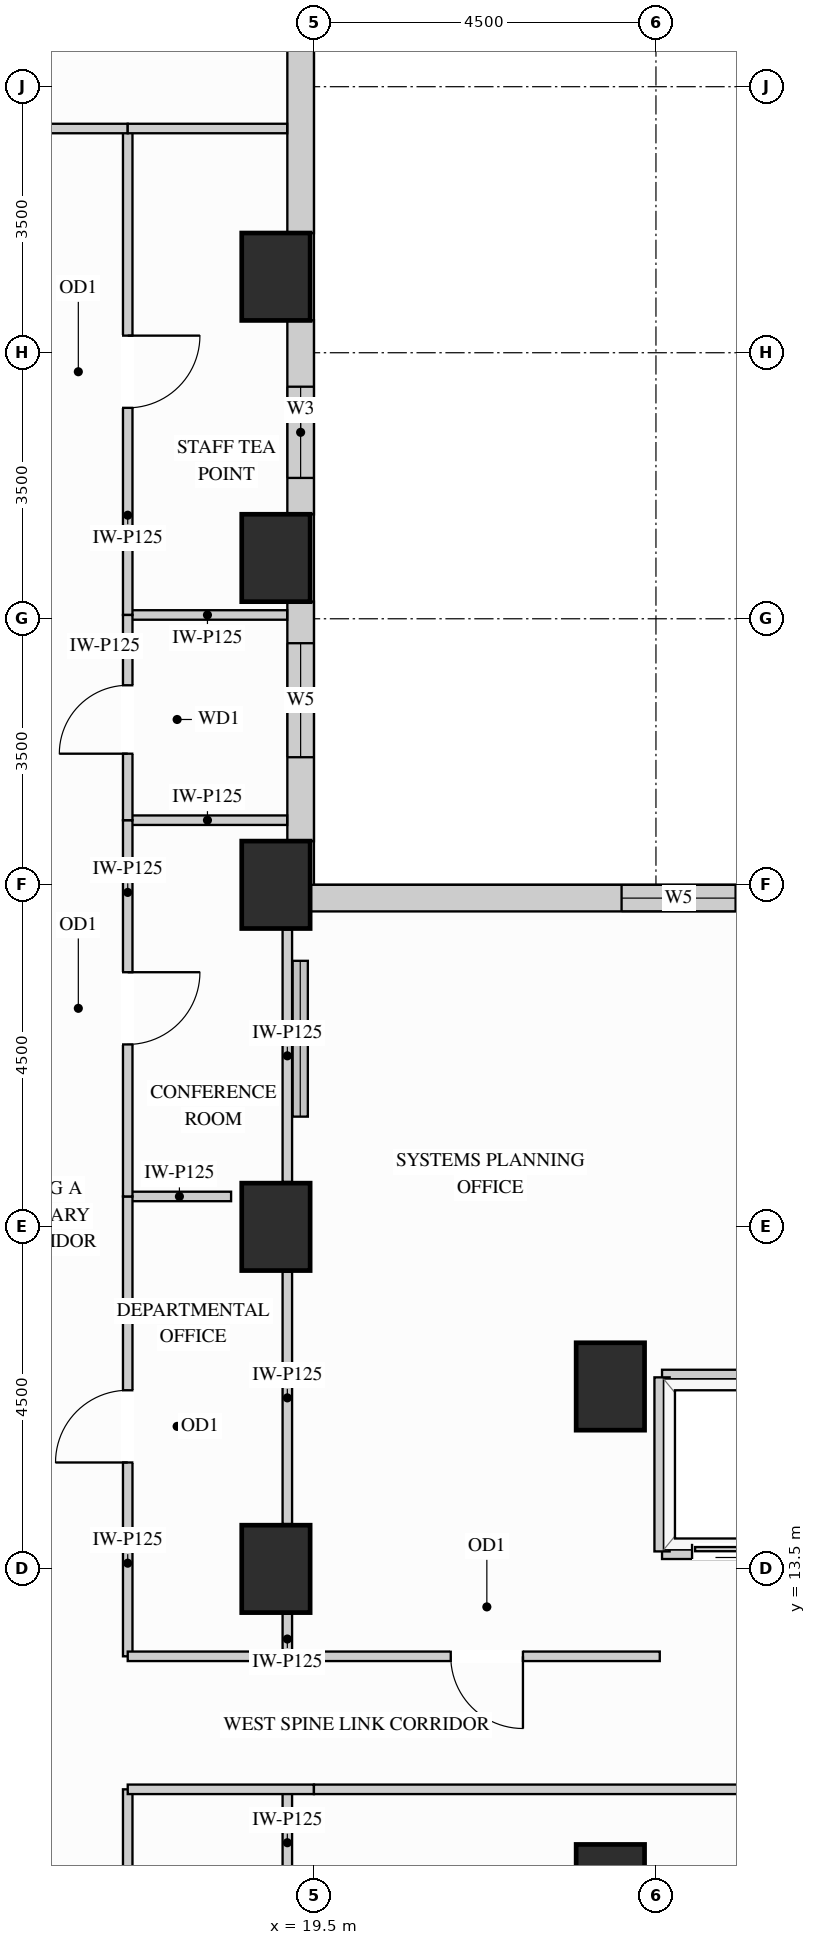
"""IFC4 building model, lengths in metres.
Left out: names, types, materials, properties, quantities, classifications, styles, units other than length and angle.
Written with IfcOpenShell. Run it as: python <this file> out.ifc"""

import sys

from ifc_helpers import new_model, si_unit, direction, frame, frame_2d, origin, origin_2d, place, context, subcontext, project, spatial, rectangle, extrude, source, transform, mapped, element, fill, save


model = new_model("IFC4")
c1 = context("Model", 3, precision=1e-05, world=origin(), true_north=direction((0.0, 1.0)))
c2 = subcontext(c1, "Body", "Model", "MODEL_VIEW")
j1 = project(units=[si_unit("LENGTHUNIT", "METRE"), si_unit("PLANEANGLEUNIT", "RADIAN")], contexts=[c1])
p1 = place(None, origin())
s1 = spatial("IfcSite", under=j1, at=p1, CompositionType="ELEMENT")
p2 = place(p1, origin())
s2 = spatial("IfcBuilding", under=s1, at=p2, CompositionType="ELEMENT")
p3 = place(p2, frame((0.0, 0.0, 81.0)))
s3 = spatial("IfcBuildingStorey", under=s2, at=p3, CompositionType="ELEMENT", Elevation=81.0)
m1 = source(origin(), c2, "Body", "SweptSolid", [
    extrude(rectangle(XDim=0.9, YDim=1.15, at=origin_2d()), origin(), (0.0, 0.0, 1.0), 3.38),
])
for number, where, z_axis, x_axis in (
    (1, (19.0, 13.5, 0.0), (0.0, 0.0, 1.0), (1.0, 0.0, 0.0)),
    (2, (19.0, 18.0, 0.0), (0.0, 0.0, 1.0), (1.0, 0.0, 0.0)),
    (3, (19.0, 22.5, 0.0), (0.0, 0.0, 1.0), (1.0, 0.0, 0.0)),
    (4, (19.0, 26.8, 0.0), (0.0, 0.0, 1.0), (1.0, 0.0, 0.0)),
    (5, (19.0, 30.5, 0.0), (0.0, 0.0, 1.0), (1.0, 0.0, 0.0)),
    (6, (23.4, 15.9, 0.0), (0.0, 0.0, 1.0), (1.0, 0.0, 0.0)),
    (7, (23.4, 9.3, 0.0), (0.0, 0.0, 1.0), (1.0, 0.0, 0.0)),
):
    element("IfcColumn", number, at=place(p3, frame(where, z_axis=z_axis, x_axis=x_axis)), inside=s3, PredefinedType="COLUMN", context=c2, shape_type="MappedRepresentation", body=[
        mapped(m1, transform((0.0, 0.0, 0.0), x_axis=(1.0, 0.0, 0.0), y_axis=(0.0, 1.0, 0.0), z_axis=(0.0, 0.0, 1.0))),
    ])
p4 = place(p3, frame((34.427, 22.325, 0.0), z_axis=(0.0, 0.0, 1.0), x_axis=(-1.0, 0.0, 0.0)))
e8 = element("IfcWall", 8, at=p4, inside=s3, PredefinedType="SOLIDWALL", context=c2, shape_type="SweptSolid", body=[
    extrude(rectangle(XDim=14.979, YDim=0.35, at=frame_2d((7.49, 0.0))), origin(), (0.0, 0.0, 1.0), 3.365),
])
p5 = place(p4, frame((4.1, 0.0, 0.78)))
e9 = element("IfcOpeningElement", 9, at=p5, cuts=e8, PredefinedType="OPENING", context=c2, shape_type="SweptSolid", body=[
    extrude(rectangle(XDim=1.5, YDim=2.0, at=frame_2d((0.75, 1.0))), frame((0.0, 0.185, 0.0), z_axis=(0.0, -1.0, 0.0), x_axis=(1.0, 0.0, 0.0)), (0.0, 0.0, 1.0), 0.37),
])
p6 = place(p4, frame((9.379, 0.0, 0.78)))
e10 = element("IfcOpeningElement", 10, at=p6, cuts=e8, PredefinedType="OPENING", context=c2, shape_type="SweptSolid", body=[
    extrude(rectangle(XDim=1.5, YDim=2.0, at=frame_2d((0.75, 1.0))), frame((0.0, 0.185, 0.0), z_axis=(0.0, -1.0, 0.0), x_axis=(1.0, 0.0, 0.0)), (0.0, 0.0, 1.0), 0.37),
])
p7 = place(p3, frame((19.325, 23.073, 0.0), z_axis=(0.0, 0.0, 1.0), x_axis=(0.0, 1.0, 0.0)))
e11 = element("IfcWall", 11, at=p7, inside=s3, PredefinedType="SOLIDWALL", context=c2, shape_type="SweptSolid", body=[
    extrude(rectangle(XDim=3.154, YDim=0.35, at=frame_2d((1.577, 0.0))), origin(), (0.0, 0.0, 1.0), 2.519),
])
p8 = place(p7, frame((1.105, 0.0, 0.78)))
e12 = element("IfcOpeningElement", 12, at=p8, cuts=e11, PredefinedType="OPENING", context=c2, shape_type="SweptSolid", body=[
    extrude(rectangle(XDim=1.5, YDim=1.559, at=frame_2d((0.75, 0.78))), frame((0.0, 0.185, 0.0), z_axis=(0.0, -1.0, 0.0), x_axis=(1.0, 0.0, 0.0)), (0.0, 0.0, 1.0), 0.37),
])
p9 = place(p3, frame((19.325, 27.373, 0.0), z_axis=(0.0, 0.0, 1.0), x_axis=(0.0, 1.0, 0.0)))
e13 = element("IfcWall", 13, at=p9, inside=s3, PredefinedType="SOLIDWALL", context=c2, shape_type="SweptSolid", body=[
    extrude(rectangle(XDim=2.554, YDim=0.35, at=frame_2d((1.277, 0.0))), origin(), (0.0, 0.0, 1.0), 2.519),
])
p10 = place(p9, frame((0.48, 0.0, 0.78)))
e14 = element("IfcOpeningElement", 14, at=p10, cuts=e13, PredefinedType="OPENING", context=c2, shape_type="SweptSolid", body=[
    extrude(rectangle(XDim=1.2, YDim=1.559, at=frame_2d((0.6, 0.78))), frame((0.0, 0.185, 0.0), z_axis=(0.0, -1.0, 0.0), x_axis=(1.0, 0.0, 0.0)), (0.0, 0.0, 1.0), 0.37),
])
m2 = source(origin(), c2, "Body", "SweptSolid", [
    extrude(rectangle(XDim=3.354, YDim=0.35, at=frame_2d((1.677, 0.0))), origin(), (0.0, 0.0, 1.0), 2.519),
])
p11 = place(p3, frame((19.325, 31.073, 0.0), z_axis=(0.0, 0.0, 1.0), x_axis=(0.0, 1.0, 0.0)))
e15 = element("IfcWall", 15, at=p11, inside=s3, PredefinedType="SOLIDWALL", context=c2, shape_type="MappedRepresentation", body=[
    mapped(m2, transform((0.0, 0.0, 0.0), x_axis=(1.0, 0.0, 0.0), y_axis=(0.0, 1.0, 0.0), z_axis=(0.0, 0.0, 1.0))),
])
m3 = source(origin(), c2, "Body", "SweptSolid", [
    extrude(rectangle(XDim=1.36, YDim=0.125, at=frame_2d((0.68, 0.0))), origin(), (0.0, 0.0, 1.0), 3.365),
])
p12 = place(p3, frame((17.05, 18.4, 0.0), z_axis=(0.0, 0.0, 1.0), x_axis=(1.0, 0.0, 0.0)))
e16 = element("IfcWall", 16, at=p12, inside=s3, PredefinedType="PARTITIONING", context=c2, shape_type="MappedRepresentation", body=[
    mapped(m3, transform((0.0, 0.0, 0.0), x_axis=(1.0, 0.0, 0.0), y_axis=(0.0, 1.0, 0.0), z_axis=(0.0, 0.0, 1.0))),
])
m4 = source(origin(), c2, "Body", "SweptSolid", [
    extrude(rectangle(XDim=2.098, YDim=0.125, at=frame_2d((1.049, 0.0))), origin(), (0.0, 0.0, 1.0), 3.365),
])
for number, where, z_axis, x_axis in (
    (17, (17.05, 23.35, 0.0), (0.0, 0.0, 1.0), (1.0, 0.0, 0.0)),
    (18, (17.05, 26.05, 0.0), (0.0, 0.0, 1.0), (1.0, 0.0, 0.0)),
):
    element("IfcWall", number, at=place(p3, frame(where, z_axis=z_axis, x_axis=x_axis)), inside=s3, PredefinedType="PARTITIONING", context=c2, shape_type="MappedRepresentation", body=[
        mapped(m4, transform((0.0, 0.0, 0.0), x_axis=(1.0, 0.0, 0.0), y_axis=(0.0, 1.0, 0.0), z_axis=(0.0, 0.0, 1.0))),
    ])
m5 = source(origin(), c2, "Body", "SweptSolid", [
    extrude(rectangle(XDim=0.56, YDim=0.125, at=frame_2d((0.28, 0.0))), origin(), (0.0, 0.0, 1.0), 2.677),
])
p13 = place(p3, frame((19.15, 12.35, 0.0), z_axis=(0.0, 0.0, 1.0), x_axis=(0.0, 1.0, 0.0)))
e19 = element("IfcWall", 19, at=p13, inside=s3, PredefinedType="PARTITIONING", context=c2, shape_type="MappedRepresentation", body=[
    mapped(m5, transform((0.0, 0.0, 0.0), x_axis=(1.0, 0.0, 0.0), y_axis=(0.0, 1.0, 0.0), z_axis=(0.0, 0.0, 1.0))),
])
m6 = source(origin(), c2, "Body", "SweptSolid", [
    extrude(rectangle(XDim=3.32, YDim=0.125, at=frame_2d((1.66, 0.0))), origin(), (0.0, 0.0, 1.0), 2.677),
])
for number, where, z_axis, x_axis in (
    (20, (19.15, 14.09, 0.0), (0.0, 0.0, 1.0), (0.0, 1.0, 0.0)),
    (21, (19.15, 18.59, 0.0), (0.0, 0.0, 1.0), (0.0, 1.0, 0.0)),
):
    element("IfcWall", number, at=place(p3, frame(where, z_axis=z_axis, x_axis=x_axis)), inside=s3, PredefinedType="PARTITIONING", context=c2, shape_type="MappedRepresentation", body=[
        mapped(m6, transform((0.0, 0.0, 0.0), x_axis=(1.0, 0.0, 0.0), y_axis=(0.0, 1.0, 0.0), z_axis=(0.0, 0.0, 1.0))),
    ])
m7 = source(origin(), c2, "Body", "SweptSolid", [
    extrude(rectangle(XDim=1.51, YDim=0.125, at=frame_2d((0.755, 0.0))), origin(), (0.0, 0.0, 1.0), 2.677),
])
p14 = place(p3, frame((19.15, 9.09, 0.0), z_axis=(0.0, 0.0, 1.0), x_axis=(0.0, 1.0, 0.0)))
e22 = element("IfcWall", 22, at=p14, inside=s3, PredefinedType="PARTITIONING", context=c2, shape_type="MappedRepresentation", body=[
    mapped(m7, transform((0.0, 0.0, 0.0), x_axis=(1.0, 0.0, 0.0), y_axis=(0.0, 1.0, 0.0), z_axis=(0.0, 0.0, 1.0))),
])
p15 = place(p3, frame((17.05, 12.35, 0.0), z_axis=(0.0, 0.0, 1.0), x_axis=(0.0, 1.0, 0.0)))
e23 = element("IfcWall", 23, at=p15, inside=s3, PredefinedType="PARTITIONING", context=c2, shape_type="SweptSolid", body=[
    extrude(rectangle(XDim=6.05, YDim=0.125, at=frame_2d((3.025, 0.0))), origin(), (0.0, 0.0, 1.0), 3.365),
])
p16 = place(p15, frame((2.55, 0.0, 0.0)))
e24 = element("IfcOpeningElement", 24, at=p16, cuts=e23, PredefinedType="OPENING", context=c2, shape_type="SweptSolid", body=[
    extrude(rectangle(XDim=0.95, YDim=2.15, at=frame_2d((0.475, 1.075))), frame((0.0, 0.073, 0.0), z_axis=(0.0, -1.0, 0.0), x_axis=(1.0, 0.0, 0.0)), (0.0, 0.0, 1.0), 0.145),
])
p17 = place(p3, frame((17.05, 18.4, 0.0), z_axis=(0.0, 0.0, 1.0), x_axis=(0.0, 1.0, 0.0)))
e25 = element("IfcWall", 25, at=p17, inside=s3, PredefinedType="PARTITIONING", context=c2, shape_type="SweptSolid", body=[
    extrude(rectangle(XDim=4.95, YDim=0.125, at=frame_2d((2.475, 0.0))), origin(), (0.0, 0.0, 1.0), 3.365),
])
p18 = place(p17, frame((2.0, 0.0, 0.0)))
e26 = element("IfcOpeningElement", 26, at=p18, cuts=e25, PredefinedType="OPENING", context=c2, shape_type="SweptSolid", body=[
    extrude(rectangle(XDim=0.95, YDim=2.15, at=frame_2d((0.475, 1.075))), frame((0.0, 0.073, 0.0), z_axis=(0.0, -1.0, 0.0), x_axis=(1.0, 0.0, 0.0)), (0.0, 0.0, 1.0), 0.145),
])
p19 = place(p3, frame((17.05, 26.05, 0.0), z_axis=(0.0, 0.0, 1.0), x_axis=(0.0, 1.0, 0.0)))
e27 = element("IfcWall", 27, at=p19, inside=s3, PredefinedType="PARTITIONING", context=c2, shape_type="SweptSolid", body=[
    extrude(rectangle(XDim=6.4, YDim=0.125, at=frame_2d((3.2, 0.0))), origin(), (0.0, 0.0, 1.0), 3.365),
])
p20 = place(p19, frame((2.725, 0.0, 0.0)))
e28 = element("IfcOpeningElement", 28, at=p20, cuts=e27, PredefinedType="OPENING", context=c2, shape_type="SweptSolid", body=[
    extrude(rectangle(XDim=0.95, YDim=2.15, at=frame_2d((0.475, 1.075))), frame((0.0, 0.073, 0.0), z_axis=(0.0, -1.0, 0.0), x_axis=(1.0, 0.0, 0.0)), (0.0, 0.0, 1.0), 0.145),
])
p21 = place(p3, frame((17.05, 5.5, 0.0), z_axis=(0.0, 0.0, 1.0), x_axis=(0.0, 1.0, 0.0)))
e29 = element("IfcWall", 29, at=p21, inside=s3, PredefinedType="PARTITIONING", context=c2, shape_type="SweptSolid", body=[
    extrude(rectangle(XDim=5.1, YDim=0.125, at=frame_2d((2.55, 0.0))), origin(), (0.0, 0.0, 1.0), 3.365),
])
p22 = place(p21, frame((2.075, 0.0, 0.0)))
e30 = element("IfcOpeningElement", 30, at=p22, cuts=e29, PredefinedType="OPENING", context=c2, shape_type="SweptSolid", body=[
    extrude(rectangle(XDim=0.95, YDim=2.15, at=frame_2d((0.475, 1.075))), frame((0.0, 0.073, 0.0), z_axis=(0.0, -1.0, 0.0), x_axis=(1.0, 0.0, 0.0)), (0.0, 0.0, 1.0), 0.145),
])
p23 = place(p3, frame((17.05, 23.35, 0.0), z_axis=(0.0, 0.0, 1.0), x_axis=(0.0, 1.0, 0.0)))
e31 = element("IfcWall", 31, at=p23, inside=s3, PredefinedType="PARTITIONING", context=c2, shape_type="SweptSolid", body=[
    extrude(rectangle(XDim=2.7, YDim=0.125, at=frame_2d((1.35, 0.0))), origin(), (0.0, 0.0, 1.0), 3.365),
])
p24 = place(p23, frame((0.875, 0.0, 0.0)))
e32 = element("IfcOpeningElement", 32, at=p24, cuts=e31, PredefinedType="OPENING", context=c2, shape_type="SweptSolid", body=[
    extrude(rectangle(XDim=0.9, YDim=2.15, at=frame_2d((0.45, 1.075))), frame((0.0, 0.073, 0.0), z_axis=(0.0, -1.0, 0.0), x_axis=(1.0, 0.0, 0.0)), (0.0, 0.0, 1.0), 0.145),
])
p25 = place(p3, frame((9.039, 32.45, 0.0), z_axis=(0.0, 0.0, 1.0), x_axis=(1.0, 0.0, 0.0)))
e33 = element("IfcWall", 33, at=p25, inside=s3, PredefinedType="PARTITIONING", context=c2, shape_type="SweptSolid", body=[
    extrude(rectangle(XDim=8.011, YDim=0.125, at=frame_2d((4.005, 0.0))), origin(), (0.0, 0.0, 1.0), 3.365),
])
p26 = place(p25, frame((3.531, 0.0, 0.0)))
e34 = element("IfcOpeningElement", 34, at=p26, cuts=e33, PredefinedType="OPENING", context=c2, shape_type="SweptSolid", body=[
    extrude(rectangle(XDim=0.95, YDim=2.15, at=frame_2d((0.475, 1.075))), frame((0.0, 0.073, 0.0), z_axis=(0.0, -1.0, 0.0), x_axis=(1.0, 0.0, 0.0)), (0.0, 0.0, 1.0), 0.145),
])
p27 = place(p3, frame((17.05, 32.45, 0.0), z_axis=(0.0, 0.0, 1.0), x_axis=(1.0, 0.0, 0.0)))
e35 = element("IfcWall", 35, at=p27, inside=s3, PredefinedType="PARTITIONING", context=c2, shape_type="MappedRepresentation", body=[
    mapped(m4, transform((0.0, 0.0, 0.0), x_axis=(1.0, 0.0, 0.0), y_axis=(0.0, 1.0, 0.0), z_axis=(0.0, 0.0, 1.0))),
])
m8 = source(origin(), c2, "Body", "SweptSolid", [
    extrude(rectangle(XDim=2.45, YDim=0.125, at=frame_2d((1.225, 0.0))), origin(), (0.0, 0.0, 1.0), 3.365),
])
p28 = place(p3, frame((17.05, 12.35, 0.0), z_axis=(0.0, 0.0, 1.0), x_axis=(1.0, 0.0, 0.0)))
e36 = element("IfcWall", 36, at=p28, inside=s3, PredefinedType="PARTITIONING", context=c2, shape_type="MappedRepresentation", body=[
    mapped(m8, transform((0.0, 0.0, 0.0), x_axis=(1.0, 0.0, 0.0), y_axis=(0.0, 1.0, 0.0), z_axis=(0.0, 0.0, 1.0))),
])
p29 = place(p3, frame((19.5, 12.35, 0.0), z_axis=(0.0, 0.0, 1.0), x_axis=(1.0, 0.0, 0.0)))
e37 = element("IfcWall", 37, at=p29, inside=s3, PredefinedType="PARTITIONING", context=c2, shape_type="SweptSolid", body=[
    extrude(rectangle(XDim=4.55, YDim=0.125, at=frame_2d((2.275, 0.0))), origin(), (0.0, 0.0, 1.0), 3.365),
])
p30 = place(p29, frame((1.8, 0.0, 0.0)))
e38 = element("IfcOpeningElement", 38, at=p30, cuts=e37, PredefinedType="OPENING", context=c2, shape_type="SweptSolid", body=[
    extrude(rectangle(XDim=0.95, YDim=2.15, at=frame_2d((0.475, 1.075))), frame((0.0, 0.073, 0.0), z_axis=(0.0, -1.0, 0.0), x_axis=(1.0, 0.0, 0.0)), (0.0, 0.0, 1.0), 0.145),
])
p31 = place(p3, frame((17.05, 10.6, 0.0), z_axis=(0.0, 0.0, 1.0), x_axis=(1.0, 0.0, 0.0)))
e39 = element("IfcWall", 39, at=p31, inside=s3, PredefinedType="PARTITIONING", context=c2, shape_type="MappedRepresentation", body=[
    mapped(m8, transform((0.0, 0.0, 0.0), x_axis=(1.0, 0.0, 0.0), y_axis=(0.0, 1.0, 0.0), z_axis=(0.0, 0.0, 1.0))),
])
p32 = place(p3, frame((19.5, 10.6, 0.0), z_axis=(0.0, 0.0, 1.0), x_axis=(1.0, 0.0, 0.0)))
e40 = element("IfcWall", 40, at=p32, inside=s3, PredefinedType="PARTITIONING", context=c2, shape_type="SweptSolid", body=[
    extrude(rectangle(XDim=14.9, YDim=0.125, at=frame_2d((7.45, 0.0))), origin(), (0.0, 0.0, 1.0), 3.365),
])
p33 = place(p32, frame((6.975, 0.0, 0.0)))
e41 = element("IfcOpeningElement", 41, at=p33, cuts=e40, PredefinedType="OPENING", context=c2, shape_type="SweptSolid", body=[
    extrude(rectangle(XDim=0.95, YDim=2.15, at=frame_2d((0.475, 1.075))), frame((0.0, 0.073, 0.0), z_axis=(0.0, -1.0, 0.0), x_axis=(1.0, 0.0, 0.0)), (0.0, 0.0, 1.0), 0.145),
])
m9 = source(origin(), c2, "Body", "SweptSolid", [
    extrude(rectangle(XDim=1.89, YDim=0.2, at=frame_2d((0.945, 0.0))), origin(), (0.0, 0.0, 1.0), 2.677),
])
p34 = place(p3, frame((24.08, 16.02, 0.0), z_axis=(0.0, 0.0, 1.0), x_axis=(1.0, 0.0, 0.0)))
e42 = element("IfcWall", 42, at=p34, inside=s3, PredefinedType="PARTITIONING", context=c2, shape_type="MappedRepresentation", body=[
    mapped(m9, transform((0.0, 0.0, 0.0), x_axis=(1.0, 0.0, 0.0), y_axis=(0.0, 1.0, 0.0), z_axis=(0.0, 0.0, 1.0))),
])
p35 = place(p3, frame((24.08, 13.73, 0.0), z_axis=(0.0, 0.0, 1.0), x_axis=(1.0, 0.0, 0.0)))
e43 = element("IfcWall", 43, at=p35, inside=s3, PredefinedType="PARTITIONING", context=c2, shape_type="SweptSolid", body=[
    extrude(rectangle(XDim=1.89, YDim=0.2, at=frame_2d((0.945, 0.0))), origin(), (0.0, 0.0, 1.0), 2.446),
])
p36 = place(p35, frame((0.395, 0.0, 0.0)))
e44 = element("IfcOpeningElement", 44, at=p36, cuts=e43, PredefinedType="OPENING", context=c2, shape_type="SweptSolid", body=[
    extrude(rectangle(XDim=1.1, YDim=2.2, at=frame_2d((0.55, 1.1))), frame((0.0, 0.11, 0.0), z_axis=(0.0, -1.0, 0.0), x_axis=(1.0, 0.0, 0.0)), (0.0, 0.0, 1.0), 0.22),
])
m10 = source(origin(), c2, "Body", "SweptSolid", [
    extrude(rectangle(XDim=2.29, YDim=0.2, at=frame_2d((1.145, 0.0))), origin(), (0.0, 0.0, 1.0), 3.365),
])
p37 = place(p3, frame((24.08, 13.73, 0.0), z_axis=(0.0, 0.0, 1.0), x_axis=(0.0, 1.0, 0.0)))
e45 = element("IfcWall", 45, at=p37, inside=s3, PredefinedType="PARTITIONING", context=c2, shape_type="MappedRepresentation", body=[
    mapped(m10, transform((0.0, 0.0, 0.0), x_axis=(1.0, 0.0, 0.0), y_axis=(0.0, 1.0, 0.0), z_axis=(0.0, 0.0, 1.0))),
])
m11 = source(origin(), c2, "Body", "SweptSolid", [
    extrude(rectangle(XDim=1.1, YDim=2.2, at=frame_2d((0.55, 1.1))), frame((0.0, 0.025, 0.0), z_axis=(0.0, -1.0, 0.0), x_axis=(1.0, 0.0, 0.0)), (0.0, 0.0, 1.0), 0.05),
])
p38 = place(p36, origin())
e46 = element("IfcDoor", 46, at=p38, inside=s3, OperationType="SLIDING_TO_LEFT", PredefinedType="DOOR", context=c2, shape_type="MappedRepresentation", body=[
    mapped(m11, transform((0.0, 0.0, 0.0), x_axis=(1.0, 0.0, 0.0), y_axis=(0.0, 1.0, 0.0), z_axis=(0.0, 0.0, 1.0))),
])
fill(e44, e46)
m12 = source(origin(), c2, "Body", "SweptSolid", [
    extrude(rectangle(XDim=0.95, YDim=2.15, at=frame_2d((0.475, 1.075))), frame((0.0, 0.025, 0.0), z_axis=(0.0, -1.0, 0.0), x_axis=(1.0, 0.0, 0.0)), (0.0, 0.0, 1.0), 0.05),
])
p39 = place(p16, origin())
e47 = element("IfcDoor", 47, at=p39, inside=s3, OperationType="SINGLE_SWING_LEFT", PredefinedType="DOOR", context=c2, shape_type="MappedRepresentation", body=[
    mapped(m12, transform((0.0, 0.0, 0.0), x_axis=(1.0, 0.0, 0.0), y_axis=(0.0, 1.0, 0.0), z_axis=(0.0, 0.0, 1.0))),
])
fill(e24, e47)
p40 = place(p18, origin())
e48 = element("IfcDoor", 48, at=p40, inside=s3, OperationType="SINGLE_SWING_RIGHT", PredefinedType="DOOR", context=c2, shape_type="MappedRepresentation", body=[
    mapped(m12, transform((0.0, 0.0, 0.0), x_axis=(1.0, 0.0, 0.0), y_axis=(0.0, 1.0, 0.0), z_axis=(0.0, 0.0, 1.0))),
])
fill(e26, e48)
p41 = place(p20, origin())
e49 = element("IfcDoor", 49, at=p41, inside=s3, OperationType="SINGLE_SWING_RIGHT", PredefinedType="DOOR", context=c2, shape_type="MappedRepresentation", body=[
    mapped(m12, transform((0.0, 0.0, 0.0), x_axis=(1.0, 0.0, 0.0), y_axis=(0.0, 1.0, 0.0), z_axis=(0.0, 0.0, 1.0))),
])
fill(e28, e49)
p42 = place(p30, origin())
e50 = element("IfcDoor", 50, at=p42, inside=s3, OperationType="SINGLE_SWING_RIGHT", PredefinedType="DOOR", context=c2, shape_type="MappedRepresentation", body=[
    mapped(m12, transform((0.0, 0.0, 0.0), x_axis=(1.0, 0.0, 0.0), y_axis=(0.0, 1.0, 0.0), z_axis=(0.0, 0.0, 1.0))),
])
fill(e38, e50)
m13 = source(origin(), c2, "Body", "SweptSolid", [
    extrude(rectangle(XDim=0.9, YDim=2.15, at=frame_2d((0.45, 1.075))), frame((0.0, 0.025, 0.0), z_axis=(0.0, -1.0, 0.0), x_axis=(1.0, 0.0, 0.0)), (0.0, 0.0, 1.0), 0.05),
])
p43 = place(p24, origin())
e51 = element("IfcDoor", 51, at=p43, inside=s3, OperationType="SINGLE_SWING_LEFT", PredefinedType="DOOR", context=c2, shape_type="MappedRepresentation", body=[
    mapped(m13, transform((0.0, 0.0, 0.0), x_axis=(1.0, 0.0, 0.0), y_axis=(0.0, 1.0, 0.0), z_axis=(0.0, 0.0, 1.0))),
])
fill(e32, e51)
m14 = source(origin(), c2, "Body", "SweptSolid", [
    extrude(rectangle(XDim=1.2, YDim=1.559, at=frame_2d((0.6, 0.78))), frame((0.0, 0.03, 0.0), z_axis=(0.0, -1.0, 0.0), x_axis=(1.0, 0.0, 0.0)), (0.0, 0.0, 1.0), 0.06),
])
p44 = place(p10, origin())
e52 = element("IfcWindow", 52, at=p44, inside=s3, PartitioningType="SINGLE_PANEL", PredefinedType="WINDOW", context=c2, shape_type="MappedRepresentation", body=[
    mapped(m14, transform((0.0, 0.0, 0.0), x_axis=(1.0, 0.0, 0.0), y_axis=(0.0, 1.0, 0.0), z_axis=(0.0, 0.0, 1.0))),
])
fill(e14, e52)
m15 = source(origin(), c2, "Body", "SweptSolid", [
    extrude(rectangle(XDim=1.5, YDim=2.0, at=frame_2d((0.75, 1.0))), frame((0.0, 0.03, 0.0), z_axis=(0.0, -1.0, 0.0), x_axis=(1.0, 0.0, 0.0)), (0.0, 0.0, 1.0), 0.06),
])
p45 = place(p6, origin())
e53 = element("IfcWindow", 53, at=p45, inside=s3, PartitioningType="SINGLE_PANEL", PredefinedType="WINDOW", context=c2, shape_type="MappedRepresentation", body=[
    mapped(m15, transform((0.0, 0.0, 0.0), x_axis=(1.0, 0.0, 0.0), y_axis=(0.0, 1.0, 0.0), z_axis=(0.0, 0.0, 1.0))),
])
fill(e10, e53)
m16 = source(origin(), c2, "Body", "SweptSolid", [
    extrude(rectangle(XDim=1.5, YDim=1.559, at=frame_2d((0.75, 0.78))), frame((0.0, 0.03, 0.0), z_axis=(0.0, -1.0, 0.0), x_axis=(1.0, 0.0, 0.0)), (0.0, 0.0, 1.0), 0.06),
])
p46 = place(p8, origin())
e54 = element("IfcWindow", 54, at=p46, inside=s3, PartitioningType="SINGLE_PANEL", PredefinedType="WINDOW", context=c2, shape_type="MappedRepresentation", body=[
    mapped(m16, transform((0.0, 0.0, 0.0), x_axis=(1.0, 0.0, 0.0), y_axis=(0.0, 1.0, 0.0), z_axis=(0.0, 0.0, 1.0))),
])
fill(e12, e54)
save(model, sys.argv[1])
